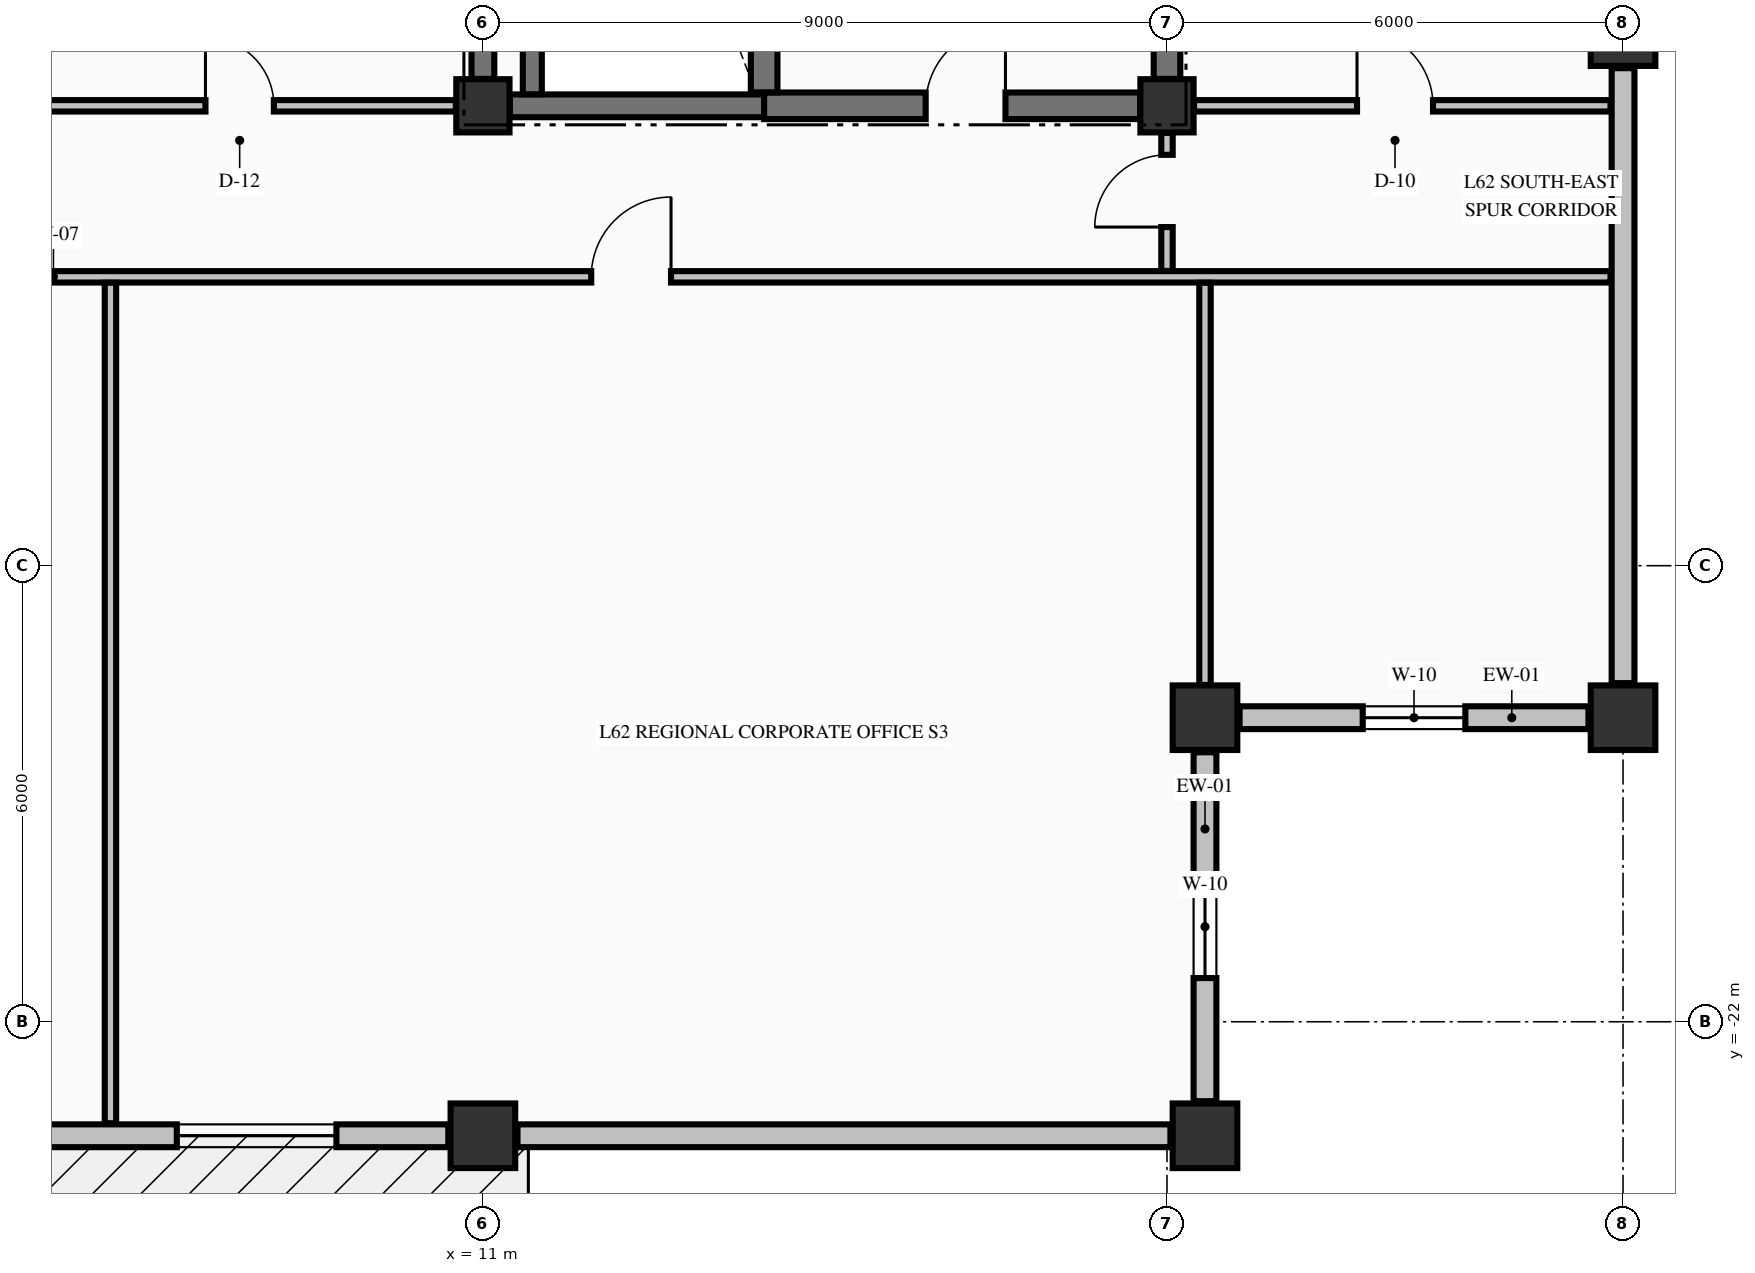
"""IFC4 building model, lengths in metres.
Left out: names, types, materials, properties, quantities, classifications, styles, units other than length and angle.
Written with IfcOpenShell. Run it as: python <this file> out.ifc"""

import sys

from ifc_helpers import new_model, si_unit, direction, frame, frame_2d, origin, origin_2d, place, context, subcontext, project, spatial, rectangle, extrude, element, fill, save


model = new_model("IFC4")
c1 = context("Model", 3, precision=1e-05, world=origin(), true_north=direction((0.0, 1.0)))
c2 = subcontext(c1, "Body", "Model", "MODEL_VIEW")
j1 = project(units=[si_unit("LENGTHUNIT", "METRE"), si_unit("PLANEANGLEUNIT", "RADIAN")], contexts=[c1])
p1 = place(None, origin())
s1 = spatial("IfcSite", under=j1, at=p1, CompositionType="ELEMENT")
p2 = place(p1, origin())
s2 = spatial("IfcBuilding", under=s1, at=p2, CompositionType="ELEMENT")
p3 = place(p2, frame((0.0, 0.0, 236.51)))
s3 = spatial("IfcBuildingStorey", under=s2, at=p3, CompositionType="ELEMENT", Elevation=236.51)
for number, where, z_axis, x_axis in (
    (1, (11.0, -23.5, -0.25), (0.0, 0.0, 1.0), (1.0, 0.0, 0.0)),
    (2, (20.5, -23.5, -0.25), (0.0, 0.0, 1.0), (1.0, 0.0, 0.0)),
    (3, (26.0, -18.0, -0.25), (0.0, 0.0, 1.0), (1.0, 0.0, 0.0)),
    (4, (26.0, -9.0, -0.25), (0.0, 0.0, 1.0), (1.0, 0.0, 0.0)),
    (5, (20.5, -18.0, -0.25), (0.0, 0.0, 1.0), (1.0, 0.0, 0.0)),
):
    element("IfcColumn", number, at=place(p3, frame(where, z_axis=z_axis, x_axis=x_axis)), inside=s3, PredefinedType="COLUMN", context=c2, shape_type="SweptSolid", body=[
        extrude(rectangle(XDim=0.85, YDim=0.85, at=origin_2d()), origin(), (0.0, 0.0, 1.0), 3.23),
    ])
for number, where, z_axis, x_axis in (
    (6, (11.0, -9.95, -0.25), (0.0, 0.0, 1.0), (1.0, 0.0, 0.0)),
    (7, (20.0, -9.95, -0.25), (0.0, 0.0, 1.0), (1.0, 0.0, 0.0)),
):
    element("IfcColumn", number, at=place(p3, frame(where, z_axis=z_axis, x_axis=x_axis)), inside=s3, PredefinedType="COLUMN", context=c2, shape_type="SweptSolid", body=[
        extrude(rectangle(XDim=0.7, YDim=0.7, at=origin_2d()), origin(), (0.0, 0.0, 1.0), 3.23),
    ])
p4 = place(p3, frame((20.5, -23.045, 0.0), z_axis=(0.0, 0.0, 1.0), x_axis=(0.0, 1.0, 0.0)))
e8 = element("IfcWall", 8, at=p4, inside=s3, PredefinedType="STANDARD", context=c2, shape_type="SweptSolid", body=[
    extrude(rectangle(XDim=4.59, YDim=0.3, at=frame_2d((2.295, 0.0))), origin(), (0.0, 0.0, 1.0), 2.372),
])
p5 = place(p4, frame((1.62, 0.0, 0.68)))
e9 = element("IfcOpeningElement", 9, at=p5, cuts=e8, PredefinedType="OPENING", context=c2, shape_type="SweptSolid", body=[
    extrude(rectangle(XDim=1.35, YDim=1.42, at=frame_2d((0.675, 0.71))), frame((0.0, 0.16, 0.0), z_axis=(0.0, -1.0, 0.0), x_axis=(1.0, 0.0, 0.0)), (0.0, 0.0, 1.0), 0.32),
])
p6 = place(p3, frame((20.955, -18.0, 0.0), z_axis=(0.0, 0.0, 1.0), x_axis=(1.0, 0.0, 0.0)))
e10 = element("IfcWall", 10, at=p6, inside=s3, PredefinedType="STANDARD", context=c2, shape_type="SweptSolid", body=[
    extrude(rectangle(XDim=4.59, YDim=0.3, at=frame_2d((2.295, 0.0))), origin(), (0.0, 0.0, 1.0), 2.372),
])
p7 = place(p6, frame((1.62, 0.0, 0.68)))
e11 = element("IfcOpeningElement", 11, at=p7, cuts=e10, PredefinedType="OPENING", context=c2, shape_type="SweptSolid", body=[
    extrude(rectangle(XDim=1.35, YDim=1.42, at=frame_2d((0.675, 0.71))), frame((0.0, 0.16, 0.0), z_axis=(0.0, -1.0, 0.0), x_axis=(1.0, 0.0, 0.0)), (0.0, 0.0, 1.0), 0.32),
])
p8 = place(p3, frame((0.455, -23.5, 0.0), z_axis=(0.0, 0.0, 1.0), x_axis=(1.0, 0.0, 0.0)))
e12 = element("IfcWall", 12, at=p8, inside=s3, PredefinedType="STANDARD", context=c2, shape_type="SweptSolid", body=[
    extrude(rectangle(XDim=10.09, YDim=0.3, at=frame_2d((5.045, 0.0))), origin(), (0.0, 0.0, 1.0), 2.372),
])
p9 = place(p8, frame((1.472, 0.0, 0.7)))
e13 = element("IfcOpeningElement", 13, at=p9, cuts=e12, PredefinedType="OPENING", context=c2, shape_type="SweptSolid", body=[
    extrude(rectangle(XDim=2.1, YDim=1.5, at=frame_2d((1.05, 0.75))), frame((0.0, 0.16, 0.0), z_axis=(0.0, -1.0, 0.0), x_axis=(1.0, 0.0, 0.0)), (0.0, 0.0, 1.0), 0.32),
])
p10 = place(p8, frame((6.518, 0.0, 0.7)))
e14 = element("IfcOpeningElement", 14, at=p10, cuts=e12, PredefinedType="OPENING", context=c2, shape_type="SweptSolid", body=[
    extrude(rectangle(XDim=2.1, YDim=1.5, at=frame_2d((1.05, 0.75))), frame((0.0, 0.16, 0.0), z_axis=(0.0, -1.0, 0.0), x_axis=(1.0, 0.0, 0.0)), (0.0, 0.0, 1.0), 0.32),
])
p11 = place(p3, frame((11.455, -23.5, 0.0), z_axis=(0.0, 0.0, 1.0), x_axis=(1.0, 0.0, 0.0)))
e15 = element("IfcWall", 15, at=p11, inside=s3, PredefinedType="STANDARD", context=c2, shape_type="SweptSolid", body=[
    extrude(rectangle(XDim=8.59, YDim=0.3, at=frame_2d((4.295, 0.0))), origin(), (0.0, 0.0, 1.0), 2.372),
])
p12 = place(p3, frame((26.0, -17.545, 0.0), z_axis=(0.0, 0.0, 1.0), x_axis=(0.0, 1.0, 0.0)))
e16 = element("IfcWall", 16, at=p12, inside=s3, PredefinedType="STANDARD", context=c2, shape_type="SweptSolid", body=[
    extrude(rectangle(XDim=8.09, YDim=0.3, at=frame_2d((4.045, 0.0))), origin(), (0.0, 0.0, 1.0), 2.372),
])
p13 = place(p3, frame((11.354, -9.95, 0.0), z_axis=(0.0, 0.0, 1.0), x_axis=(1.0, 0.0, 0.0)))
e17 = element("IfcWall", 17, at=p13, inside=s3, PredefinedType="SHEAR", context=c2, shape_type="SweptSolid", body=[
    extrude(rectangle(XDim=3.346, YDim=0.3, at=frame_2d((1.673, 0.0))), origin(), (0.0, 0.0, 1.0), 2.98),
])
p14 = place(p3, frame((14.7, -9.95, 0.0), z_axis=(0.0, 0.0, 1.0), x_axis=(1.0, 0.0, 0.0)))
e18 = element("IfcWall", 18, at=p14, inside=s3, PredefinedType="SHEAR", context=c2, shape_type="SweptSolid", body=[
    extrude(rectangle(XDim=4.946, YDim=0.35, at=frame_2d((2.473, 0.0))), origin(), (0.0, 0.0, 1.0), 2.98),
])
p15 = place(p14, frame((2.125, 0.0, 0.0)))
e19 = element("IfcOpeningElement", 19, at=p15, cuts=e18, PredefinedType="OPENING", context=c2, shape_type="SweptSolid", body=[
    extrude(rectangle(XDim=1.05, YDim=2.15, at=frame_2d((0.525, 1.075))), frame((0.0, 0.185, 0.0), z_axis=(0.0, -1.0, 0.0), x_axis=(1.0, 0.0, 0.0)), (0.0, 0.0, 1.0), 0.37),
])
p16 = place(p3, frame((-20.075, -12.2, 0.0), z_axis=(0.0, 0.0, 1.0), x_axis=(1.0, 0.0, 0.0)))
e20 = element("IfcWall", 20, at=p16, inside=s3, PredefinedType="PARTITIONING", context=c2, shape_type="SweptSolid", body=[
    extrude(rectangle(XDim=45.91, YDim=0.15, at=frame_2d((22.955, 0.0))), origin(), (0.0, 0.0, 1.0), 2.98),
])
p17 = place(p16, frame((5.7, 0.0, 0.0)))
e21 = element("IfcOpeningElement", 21, at=p17, cuts=e20, PredefinedType="OPENING", context=c2, shape_type="SweptSolid", body=[
    extrude(rectangle(XDim=1.05, YDim=2.15, at=frame_2d((0.525, 1.075))), frame((0.0, 0.085, 0.0), z_axis=(0.0, -1.0, 0.0), x_axis=(1.0, 0.0, 0.0)), (0.0, 0.0, 1.0), 0.17),
])
p18 = place(p16, frame((17.3, 0.0, 0.0)))
e22 = element("IfcOpeningElement", 22, at=p18, cuts=e20, PredefinedType="OPENING", context=c2, shape_type="SweptSolid", body=[
    extrude(rectangle(XDim=1.05, YDim=2.15, at=frame_2d((0.525, 1.075))), frame((0.0, 0.085, 0.0), z_axis=(0.0, -1.0, 0.0), x_axis=(1.0, 0.0, 0.0)), (0.0, 0.0, 1.0), 0.17),
])
p19 = place(p16, frame((32.5, 0.0, 0.0)))
e23 = element("IfcOpeningElement", 23, at=p19, cuts=e20, PredefinedType="OPENING", context=c2, shape_type="SweptSolid", body=[
    extrude(rectangle(XDim=1.05, YDim=2.15, at=frame_2d((0.525, 1.075))), frame((0.0, 0.085, 0.0), z_axis=(0.0, -1.0, 0.0), x_axis=(1.0, 0.0, 0.0)), (0.0, 0.0, 1.0), 0.17),
])
p20 = place(p3, frame((-10.644, -9.95, 0.0), z_axis=(0.0, 0.0, 1.0), x_axis=(1.0, 0.0, 0.0)))
e24 = element("IfcWall", 24, at=p20, inside=s3, PredefinedType="PARTITIONING", context=c2, shape_type="SweptSolid", body=[
    extrude(rectangle(XDim=21.288, YDim=0.15, at=frame_2d((10.644, 0.0))), origin(), (0.0, 0.0, 1.0), 2.98),
])
p21 = place(p20, frame((6.394, 0.0, 0.0)))
e25 = element("IfcOpeningElement", 25, at=p21, cuts=e24, PredefinedType="OPENING", context=c2, shape_type="SweptSolid", body=[
    extrude(rectangle(XDim=1.1, YDim=2.15, at=frame_2d((0.55, 1.075))), frame((0.0, 0.085, 0.0), z_axis=(0.0, -1.0, 0.0), x_axis=(1.0, 0.0, 0.0)), (0.0, 0.0, 1.0), 0.17),
])
p22 = place(p20, frame((13.769, 0.0, 0.0)))
e26 = element("IfcOpeningElement", 26, at=p22, cuts=e24, PredefinedType="OPENING", context=c2, shape_type="SweptSolid", body=[
    extrude(rectangle(XDim=0.95, YDim=2.15, at=frame_2d((0.475, 1.075))), frame((0.0, 0.085, 0.0), z_axis=(0.0, -1.0, 0.0), x_axis=(1.0, 0.0, 0.0)), (0.0, 0.0, 1.0), 0.17),
])
p23 = place(p20, frame((17.994, 0.0, 0.0)))
e27 = element("IfcOpeningElement", 27, at=p23, cuts=e24, PredefinedType="OPENING", context=c2, shape_type="SweptSolid", body=[
    extrude(rectangle(XDim=0.9, YDim=2.15, at=frame_2d((0.45, 1.075))), frame((0.0, 0.085, 0.0), z_axis=(0.0, -1.0, 0.0), x_axis=(1.0, 0.0, 0.0)), (0.0, 0.0, 1.0), 0.17),
])
p24 = place(p3, frame((20.356, -9.95, 0.0), z_axis=(0.0, 0.0, 1.0), x_axis=(1.0, 0.0, 0.0)))
e28 = element("IfcWall", 28, at=p24, inside=s3, PredefinedType="PARTITIONING", context=c2, shape_type="SweptSolid", body=[
    extrude(rectangle(XDim=5.479, YDim=0.15, at=frame_2d((2.74, 0.0))), origin(), (0.0, 0.0, 1.0), 2.98),
])
p25 = place(p24, frame((2.144, 0.0, 0.0)))
e29 = element("IfcOpeningElement", 29, at=p25, cuts=e28, PredefinedType="OPENING", context=c2, shape_type="SweptSolid", body=[
    extrude(rectangle(XDim=1.0, YDim=2.15, at=frame_2d((0.5, 1.075))), frame((0.0, 0.085, 0.0), z_axis=(0.0, -1.0, 0.0), x_axis=(1.0, 0.0, 0.0)), (0.0, 0.0, 1.0), 0.17),
])
p26 = place(p3, frame((11.0, -9.596, 0.0), z_axis=(0.0, 0.0, 1.0), x_axis=(0.0, 1.0, 0.0)))
e30 = element("IfcWall", 30, at=p26, inside=s3, PredefinedType="SHEAR", context=c2, shape_type="SweptSolid", body=[
    extrude(rectangle(XDim=9.242, YDim=0.3, at=frame_2d((4.621, 0.0))), origin(), (0.0, 0.0, 1.0), 2.98),
])
p27 = place(p3, frame((11.65, -9.798, 0.0), z_axis=(0.0, 0.0, 1.0), x_axis=(0.0, 1.0, 0.0)))
e31 = element("IfcWall", 31, at=p27, inside=s3, PredefinedType="SOLIDWALL", context=c2, shape_type="SweptSolid", body=[
    extrude(rectangle(XDim=9.396, YDim=0.25, at=frame_2d((4.698, 0.0))), origin(), (0.0, 0.0, 1.0), 2.98),
])
p28 = place(p3, frame((14.7, -9.773, 0.0), z_axis=(0.0, 0.0, 1.0), x_axis=(0.0, 1.0, 0.0)))
e32 = element("IfcWall", 32, at=p28, inside=s3, PredefinedType="SHEAR", context=c2, shape_type="SweptSolid", body=[
    extrude(rectangle(XDim=9.371, YDim=0.35, at=frame_2d((4.686, 0.0))), origin(), (0.0, 0.0, 1.0), 2.98),
])
p29 = place(p3, frame((20.0, -9.596, 0.0), z_axis=(0.0, 0.0, 1.0), x_axis=(0.0, 1.0, 0.0)))
e33 = element("IfcWall", 33, at=p29, inside=s3, PredefinedType="SHEAR", context=c2, shape_type="SweptSolid", body=[
    extrude(rectangle(XDim=9.242, YDim=0.35, at=frame_2d((4.621, 0.0))), origin(), (0.0, 0.0, 1.0), 2.98),
])
p30 = place(p3, frame((6.1, -23.335, 0.0), z_axis=(0.0, 0.0, 1.0), x_axis=(0.0, 1.0, 0.0)))
e34 = element("IfcWall", 34, at=p30, inside=s3, PredefinedType="PARTITIONING", context=c2, shape_type="SweptSolid", body=[
    extrude(rectangle(XDim=11.057, YDim=0.15, at=frame_2d((5.528, 0.0))), origin(), (0.0, 0.0, 1.0), 2.98),
])
p31 = place(p3, frame((20.0, -12.122, 0.0), z_axis=(0.0, 0.0, 1.0), x_axis=(0.0, 1.0, 0.0)))
e35 = element("IfcWall", 35, at=p31, inside=s3, PredefinedType="PARTITIONING", context=c2, shape_type="SweptSolid", body=[
    extrude(rectangle(XDim=1.816, YDim=0.15, at=frame_2d((0.908, 0.0))), origin(), (0.0, 0.0, 1.0), 2.98),
])
p32 = place(p31, frame((0.577, 0.0, 0.0)))
e36 = element("IfcOpeningElement", 36, at=p32, cuts=e35, PredefinedType="OPENING", context=c2, shape_type="SweptSolid", body=[
    extrude(rectangle(XDim=0.95, YDim=2.15, at=frame_2d((0.475, 1.075))), frame((0.0, 0.085, 0.0), z_axis=(0.0, -1.0, 0.0), x_axis=(1.0, 0.0, 0.0)), (0.0, 0.0, 1.0), 0.17),
])
p33 = place(p3, frame((20.5, -17.569, 0.0), z_axis=(0.0, 0.0, 1.0), x_axis=(0.0, 1.0, 0.0)))
e37 = element("IfcWall", 37, at=p33, inside=s3, PredefinedType="PARTITIONING", context=c2, shape_type="SweptSolid", body=[
    extrude(rectangle(XDim=5.291, YDim=0.15, at=frame_2d((2.646, 0.0))), origin(), (0.0, 0.0, 1.0), 2.98),
])
p34 = place(p5, origin())
e38 = element("IfcWindow", 38, at=p34, inside=s3, PartitioningType="SINGLE_PANEL", PredefinedType="WINDOW", context=c2, shape_type="SweptSolid", body=[
    extrude(rectangle(XDim=1.35, YDim=1.42, at=frame_2d((0.675, 0.71))), frame((0.0, 0.03, 0.0), z_axis=(0.0, -1.0, 0.0), x_axis=(1.0, 0.0, 0.0)), (0.0, 0.0, 1.0), 0.06),
])
fill(e9, e38)
p35 = place(p7, origin())
e39 = element("IfcWindow", 39, at=p35, inside=s3, PartitioningType="SINGLE_PANEL", PredefinedType="WINDOW", context=c2, shape_type="SweptSolid", body=[
    extrude(rectangle(XDim=1.35, YDim=1.42, at=frame_2d((0.675, 0.71))), frame((0.0, 0.03, 0.0), z_axis=(0.0, -1.0, 0.0), x_axis=(1.0, 0.0, 0.0)), (0.0, 0.0, 1.0), 0.06),
])
fill(e11, e39)
p36 = place(p10, origin())
e40 = element("IfcWindow", 40, at=p36, inside=s3, PartitioningType="SINGLE_PANEL", PredefinedType="WINDOW", context=c2, shape_type="SweptSolid", body=[
    extrude(rectangle(XDim=2.1, YDim=1.5, at=frame_2d((1.05, 0.75))), frame((0.0, 0.03, 0.0), z_axis=(0.0, -1.0, 0.0), x_axis=(1.0, 0.0, 0.0)), (0.0, 0.0, 1.0), 0.06),
])
fill(e14, e40)
p37 = place(p15, origin())
e41 = element("IfcDoor", 41, at=p37, inside=s3, OperationType="SINGLE_SWING_RIGHT", PredefinedType="DOOR", context=c2, shape_type="SweptSolid", body=[
    extrude(rectangle(XDim=1.05, YDim=2.15, at=frame_2d((0.525, 1.075))), frame((0.0, 0.025, 0.0), z_axis=(0.0, -1.0, 0.0), x_axis=(1.0, 0.0, 0.0)), (0.0, 0.0, 1.0), 0.05),
])
fill(e19, e41)
p38 = place(p19, origin())
e42 = element("IfcDoor", 42, at=p38, inside=s3, OperationType="SINGLE_SWING_RIGHT", PredefinedType="DOOR", context=c2, shape_type="SweptSolid", body=[
    extrude(rectangle(XDim=1.05, YDim=2.15, at=frame_2d((0.525, 1.075))), frame((0.0, 0.025, 0.0), z_axis=(0.0, -1.0, 0.0), x_axis=(1.0, 0.0, 0.0)), (0.0, 0.0, 1.0), 0.05),
])
fill(e23, e42)
p39 = place(p23, origin())
e43 = element("IfcDoor", 43, at=p39, inside=s3, OperationType="SINGLE_SWING_LEFT", PredefinedType="DOOR", context=c2, shape_type="SweptSolid", body=[
    extrude(rectangle(XDim=0.9, YDim=2.15, at=frame_2d((0.45, 1.075))), frame((0.0, 0.025, 0.0), z_axis=(0.0, -1.0, 0.0), x_axis=(1.0, 0.0, 0.0)), (0.0, 0.0, 1.0), 0.05),
])
fill(e27, e43)
p40 = place(p32, origin())
e44 = element("IfcDoor", 44, at=p40, inside=s3, OperationType="SINGLE_SWING_LEFT", PredefinedType="DOOR", context=c2, shape_type="SweptSolid", body=[
    extrude(rectangle(XDim=0.95, YDim=2.15, at=frame_2d((0.475, 1.075))), frame((0.0, 0.025, 0.0), z_axis=(0.0, -1.0, 0.0), x_axis=(1.0, 0.0, 0.0)), (0.0, 0.0, 1.0), 0.05),
])
fill(e36, e44)
p41 = place(p25, origin())
e45 = element("IfcDoor", 45, at=p41, inside=s3, OperationType="SINGLE_SWING_LEFT", PredefinedType="DOOR", context=c2, shape_type="SweptSolid", body=[
    extrude(rectangle(XDim=1.0, YDim=2.15, at=frame_2d((0.5, 1.075))), frame((0.0, 0.025, 0.0), z_axis=(0.0, -1.0, 0.0), x_axis=(1.0, 0.0, 0.0)), (0.0, 0.0, 1.0), 0.05),
])
fill(e29, e45)
save(model, sys.argv[1])
